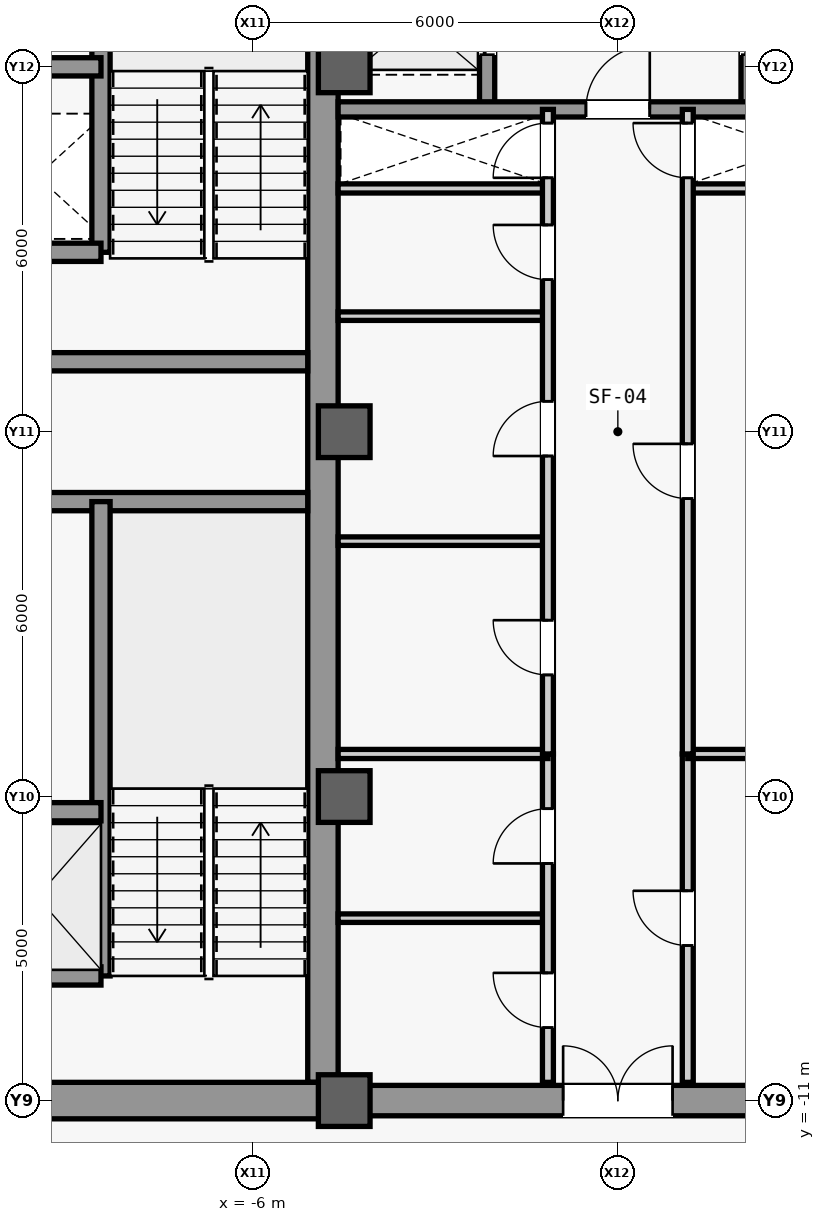
"""IFC4 building model, lengths in metres.
Left out: names, types, materials, properties, quantities, classifications, styles, units other than length and angle.
Written with IfcOpenShell. Run it as: python <this file> out.ifc"""

import sys

from ifc_helpers import new_model, si_unit, direction, frame, frame_2d, origin, origin_2d, place, context, subcontext, project, spatial, rectangle, extrude, source, transform, mapped, element, fill, save


model = new_model("IFC4")
c1 = context("Model", 3, precision=1e-05, world=origin(), true_north=direction((0.0, 1.0)))
c2 = subcontext(c1, "Body", "Model", "MODEL_VIEW")
j1 = project(units=[si_unit("LENGTHUNIT", "METRE"), si_unit("PLANEANGLEUNIT", "RADIAN")], contexts=[c1])
p1 = place(None, origin())
s1 = spatial("IfcSite", under=j1, at=p1, CompositionType="ELEMENT")
p2 = place(p1, origin())
s2 = spatial("IfcBuilding", under=s1, at=p2, CompositionType="ELEMENT")
p3 = place(p2, frame((0.0, 0.0, 211.1)))
s3 = spatial("IfcBuildingStorey", under=s2, at=p3, CompositionType="ELEMENT", Elevation=211.1)
m1 = source(origin(), c2, "Body", "SweptSolid", [
    extrude(rectangle(XDim=21.4, YDim=0.5, at=frame_2d((10.7, 0.0))), origin(), (0.0, 0.0, 1.0), 3.78),
])
p4 = place(p3, frame((-4.85, -10.7, 0.0), z_axis=(0.0, 0.0, 1.0), x_axis=(0.0, 1.0, 0.0)))
e1 = element("IfcWall", 1, at=p4, inside=s3, PredefinedType="SHEAR", context=c2, shape_type="MappedRepresentation", body=[
    mapped(m1, transform((0.0, 0.0, 0.0), scale=1.0)),
])
m2 = source(origin(), c2, "Body", "SweptSolid", [
    extrude(rectangle(XDim=5.9, YDim=0.6, at=frame_2d((2.95, 0.0))), origin(), (0.0, 0.0, 1.0), 3.78),
])
p5 = place(p3, frame((-10.75, -11.0, 0.0), z_axis=(0.0, 0.0, 1.0), x_axis=(1.0, 0.0, 0.0)))
e2 = element("IfcWall", 2, at=p5, inside=s3, PredefinedType="SHEAR", context=c2, shape_type="MappedRepresentation", body=[
    mapped(m2, transform((0.0, 0.0, 0.0), scale=1.0)),
])
m3 = source(origin(), c2, "Body", "SweptSolid", [
    extrude(rectangle(XDim=5.65, YDim=0.3, at=frame_2d((2.825, 0.0))), origin(), (0.0, 0.0, 1.0), 3.78),
])
for number, where, z_axis, x_axis in (
    (3, (-10.75, -1.15, 0.0), (0.0, 0.0, 1.0), (1.0, 0.0, 0.0)),
    (4, (-10.75, 1.15, 0.0), (0.0, 0.0, 1.0), (1.0, 0.0, 0.0)),
):
    element("IfcWall", number, at=place(p3, frame(where, z_axis=z_axis, x_axis=x_axis)), inside=s3, PredefinedType="SHEAR", context=c2, shape_type="MappedRepresentation", body=[
        mapped(m3, transform((0.0, 0.0, 0.0), scale=1.0)),
    ])
m4 = source(origin(), c2, "Body", "SweptSolid", [
    extrude(rectangle(XDim=9.2, YDim=0.5, at=frame_2d((4.6, 0.0))), origin(), (0.0, 0.0, 1.0), 3.78),
])
p6 = place(p3, frame((-4.6, -11.0, 0.0), z_axis=(0.0, 0.0, 1.0), x_axis=(1.0, 0.0, 0.0)))
e5 = element("IfcWall", 5, at=p6, inside=s3, PredefinedType="SHEAR", context=c2, shape_type="MappedRepresentation", body=[
    mapped(m4, transform((0.0, 0.0, 0.0), scale=1.0)),
])
m5 = source(origin(), c2, "Body", "SweptSolid", [
    extrude(rectangle(XDim=1.8, YDim=2.25, at=frame_2d((0.9, 1.125))), frame((0.0, 0.26, 0.0), z_axis=(0.0, -1.0, 0.0), x_axis=(1.0, 0.0, 0.0)), (0.0, 0.0, 1.0), 0.52),
])
p7 = place(p6, frame((3.7, 0.0, 0.0)))
e6 = element("IfcOpeningElement", 6, at=p7, cuts=e5, PredefinedType="OPENING", context=c2, shape_type="MappedRepresentation", body=[
    mapped(m5, transform((0.0, 0.0, 0.0), scale=1.0)),
])
m6 = source(origin(), c2, "Body", "SweptSolid", [
    extrude(rectangle(XDim=0.85, YDim=0.85, at=origin_2d()), origin(), (0.0, 0.0, 1.0), 4.0),
])
for number, where, z_axis, x_axis in (
    (7, (-4.5, -11.0, 0.0), (0.0, 0.0, 1.0), (1.0, 0.0, 0.0)),
    (8, (-4.5, -6.0, 0.0), (0.0, 0.0, 1.0), (1.0, 0.0, 0.0)),
    (9, (-4.5, 0.0, 0.0), (0.0, 0.0, 1.0), (1.0, 0.0, 0.0)),
    (10, (-4.5, 6.0, 0.0), (0.0, 0.0, 1.0), (1.0, 0.0, 0.0)),
):
    element("IfcColumn", number, at=place(p3, frame(where, z_axis=z_axis, x_axis=x_axis)), inside=s3, PredefinedType="COLUMN", context=c2, shape_type="MappedRepresentation", body=[
        mapped(m6, transform((0.0, 0.0, 0.0), scale=1.0)),
    ])
m7 = source(origin(), c2, "Body", "SweptSolid", [
    extrude(rectangle(XDim=7.8, YDim=0.3, at=frame_2d((3.9, 0.0))), origin(), (0.0, 0.0, 1.0), 3.78),
])
p8 = place(p3, frame((-8.5, -8.95, 0.0), z_axis=(0.0, 0.0, 1.0), x_axis=(0.0, 1.0, 0.0)))
e11 = element("IfcWall", 11, at=p8, inside=s3, PredefinedType="SHEAR", context=c2, shape_type="MappedRepresentation", body=[
    mapped(m7, transform((0.0, 0.0, 0.0), scale=1.0)),
])
m8 = source(origin(), c2, "Body", "SweptSolid", [
    extrude(rectangle(XDim=2.2, YDim=0.3, at=frame_2d((1.1, 0.0))), origin(), (0.0, 0.0, 1.0), 3.78),
])
for number, where, z_axis, x_axis in (
    (12, (-10.7, -8.95, 0.0), (0.0, 0.0, 1.0), (1.0, 0.0, 0.0)),
    (13, (-10.7, -6.25, 0.0), (0.0, 0.0, 1.0), (1.0, 0.0, 0.0)),
):
    element("IfcWall", number, at=place(p3, frame(where, z_axis=z_axis, x_axis=x_axis)), inside=s3, PredefinedType="SHEAR", context=c2, shape_type="MappedRepresentation", body=[
        mapped(m8, transform((0.0, 0.0, 0.0), scale=1.0)),
    ])
m9 = source(origin(), c2, "Body", "SweptSolid", [
    extrude(rectangle(XDim=7.75, YDim=0.3, at=frame_2d((3.875, 0.0))), origin(), (0.0, 0.0, 1.0), 3.78),
])
p9 = place(p3, frame((-8.5, 2.95, 0.0), z_axis=(0.0, 0.0, 1.0), x_axis=(0.0, 1.0, 0.0)))
e14 = element("IfcWall", 14, at=p9, inside=s3, PredefinedType="SHEAR", context=c2, shape_type="MappedRepresentation", body=[
    mapped(m9, transform((0.0, 0.0, 0.0), scale=1.0)),
])
for number, where, z_axis, x_axis in (
    (15, (-10.7, 2.95, 0.0), (0.0, 0.0, 1.0), (1.0, 0.0, 0.0)),
    (16, (-10.7, 6.0, 0.0), (0.0, 0.0, 1.0), (1.0, 0.0, 0.0)),
):
    element("IfcWall", number, at=place(p3, frame(where, z_axis=z_axis, x_axis=x_axis)), inside=s3, PredefinedType="SHEAR", context=c2, shape_type="MappedRepresentation", body=[
        mapped(m8, transform((0.0, 0.0, 0.0), scale=1.0)),
    ])
m10 = source(origin(), c2, "Body", "SweptSolid", [
    extrude(rectangle(XDim=3.45, YDim=0.15, at=frame_2d((1.725, 0.0))), origin(), (0.0, 0.0, 1.0), 3.78),
])
for number, where, z_axis, x_axis in (
    (17, (-4.6, 4.0, 0.0), (0.0, 0.0, 1.0), (1.0, 0.0, 0.0)),
    (18, (1.15, 4.0, 0.0), (0.0, 0.0, 1.0), (1.0, 0.0, 0.0)),
):
    element("IfcWall", number, at=place(p3, frame(where, z_axis=z_axis, x_axis=x_axis)), inside=s3, PredefinedType="PARTITIONING", context=c2, shape_type="MappedRepresentation", body=[
        mapped(m10, transform((0.0, 0.0, 0.0), scale=1.0)),
    ])
m11 = source(origin(), c2, "Body", "SweptSolid", [
    extrude(rectangle(XDim=3.45, YDim=0.14, at=frame_2d((1.725, 0.0))), origin(), (0.0, 0.0, 1.0), 3.78),
])
p10 = place(p3, frame((-4.6, -8.0, 0.0), z_axis=(0.0, 0.0, 1.0), x_axis=(1.0, 0.0, 0.0)))
e19 = element("IfcWall", 19, at=p10, inside=s3, PredefinedType="PARTITIONING", context=c2, shape_type="MappedRepresentation", body=[
    mapped(m11, transform((0.0, 0.0, 0.0), scale=1.0)),
])
m12 = source(origin(), c2, "Body", "SweptSolid", [
    extrude(rectangle(XDim=5.4, YDim=0.18, at=frame_2d((2.7, 0.0))), origin(), (0.0, 0.0, 1.0), 3.78),
])
p11 = place(p3, frame((-1.15, -10.7, 0.0), z_axis=(0.0, 0.0, 1.0), x_axis=(0.0, 1.0, 0.0)))
e20 = element("IfcWall", 20, at=p11, inside=s3, PredefinedType="PARTITIONING", context=c2, shape_type="MappedRepresentation", body=[
    mapped(m12, transform((0.0, 0.0, 0.0), scale=1.0)),
])
m13 = source(origin(), c2, "Body", "SweptSolid", [
    extrude(rectangle(XDim=0.9, YDim=2.15, at=frame_2d((0.45, 1.075))), frame((0.0, 0.1, 0.0), z_axis=(0.0, -1.0, 0.0), x_axis=(1.0, 0.0, 0.0)), (0.0, 0.0, 1.0), 0.2),
])
p12 = place(p11, frame((0.9, 0.0, 0.0)))
e21 = element("IfcOpeningElement", 21, at=p12, cuts=e20, PredefinedType="OPENING", context=c2, shape_type="MappedRepresentation", body=[
    mapped(m13, transform((0.0, 0.0, 0.0), scale=1.0)),
])
p13 = place(p11, frame((3.6, 0.0, 0.0)))
e22 = element("IfcOpeningElement", 22, at=p13, cuts=e20, PredefinedType="OPENING", context=c2, shape_type="MappedRepresentation", body=[
    mapped(m13, transform((0.0, 0.0, 0.0), scale=1.0)),
])
p14 = place(p3, frame((1.15, -10.7, 0.0), z_axis=(0.0, 0.0, 1.0), x_axis=(0.0, 1.0, 0.0)))
e23 = element("IfcWall", 23, at=p14, inside=s3, PredefinedType="PARTITIONING", context=c2, shape_type="MappedRepresentation", body=[
    mapped(m12, transform((0.0, 0.0, 0.0), scale=1.0)),
])
p15 = place(p14, frame((2.25, 0.0, 0.0)))
e24 = element("IfcOpeningElement", 24, at=p15, cuts=e23, PredefinedType="OPENING", context=c2, shape_type="MappedRepresentation", body=[
    mapped(m13, transform((0.0, 0.0, 0.0), scale=1.0)),
])
for number, where, z_axis, x_axis in (
    (25, (-4.6, -5.3, 0.0), (0.0, 0.0, 1.0), (1.0, 0.0, 0.0)),
    (26, (1.15, -5.3, 0.0), (0.0, 0.0, 1.0), (1.0, 0.0, 0.0)),
):
    element("IfcWall", number, at=place(p3, frame(where, z_axis=z_axis, x_axis=x_axis)), inside=s3, PredefinedType="PARTITIONING", context=c2, shape_type="MappedRepresentation", body=[
        mapped(m10, transform((0.0, 0.0, 0.0), scale=1.0)),
    ])
m14 = source(origin(), c2, "Body", "SweptSolid", [
    extrude(rectangle(XDim=5.4, YDim=0.25, at=frame_2d((2.7, 0.0))), origin(), (0.0, 0.0, 1.0), 3.78),
])
p16 = place(p3, frame((-2.15, 5.3, 0.0), z_axis=(0.0, 0.0, 1.0), x_axis=(0.0, 1.0, 0.0)))
e27 = element("IfcWall", 27, at=p16, inside=s3, PredefinedType="SHEAR", context=c2, shape_type="MappedRepresentation", body=[
    mapped(m14, transform((0.0, 0.0, 0.0), scale=1.0)),
])
m15 = source(origin(), c2, "Body", "SweptSolid", [
    extrude(rectangle(XDim=1.2, YDim=2.3, at=frame_2d((0.6, 1.15))), frame((0.0, 0.135, 0.0), z_axis=(0.0, -1.0, 0.0), x_axis=(1.0, 0.0, 0.0)), (0.0, 0.0, 1.0), 0.27),
])
p17 = place(p16, frame((3.3, 0.0, 0.0)))
e28 = element("IfcOpeningElement", 28, at=p17, cuts=e27, PredefinedType="OPENING", context=c2, shape_type="MappedRepresentation", body=[
    mapped(m15, transform((0.0, 0.0, 0.0), scale=1.0)),
])
p18 = place(p16, frame((0.9, 0.0, 0.0)))
e29 = element("IfcOpeningElement", 29, at=p18, cuts=e27, PredefinedType="OPENING", context=c2, shape_type="MappedRepresentation", body=[
    mapped(m15, transform((0.0, 0.0, 0.0), scale=1.0)),
])
p19 = place(p3, frame((2.15, 5.3, 0.0), z_axis=(0.0, 0.0, 1.0), x_axis=(0.0, 1.0, 0.0)))
e30 = element("IfcWall", 30, at=p19, inside=s3, PredefinedType="SHEAR", context=c2, shape_type="MappedRepresentation", body=[
    mapped(m14, transform((0.0, 0.0, 0.0), scale=1.0)),
])
p20 = place(p19, frame((3.3, 0.0, 0.0)))
e31 = element("IfcOpeningElement", 31, at=p20, cuts=e30, PredefinedType="OPENING", context=c2, shape_type="MappedRepresentation", body=[
    mapped(m15, transform((0.0, 0.0, 0.0), scale=1.0)),
])
p21 = place(p19, frame((0.9, 0.0, 0.0)))
e32 = element("IfcOpeningElement", 32, at=p21, cuts=e30, PredefinedType="OPENING", context=c2, shape_type="MappedRepresentation", body=[
    mapped(m15, transform((0.0, 0.0, 0.0), scale=1.0)),
])
m16 = source(origin(), c2, "Body", "SweptSolid", [
    extrude(rectangle(XDim=9.2, YDim=0.25, at=frame_2d((4.6, 0.0))), origin(), (0.0, 0.0, 1.0), 3.78),
])
p22 = place(p3, frame((-4.6, 5.3, 0.0), z_axis=(0.0, 0.0, 1.0), x_axis=(1.0, 0.0, 0.0)))
e33 = element("IfcWall", 33, at=p22, inside=s3, PredefinedType="SHEAR", context=c2, shape_type="MappedRepresentation", body=[
    mapped(m16, transform((0.0, 0.0, 0.0), scale=1.0)),
])
m17 = source(origin(), c2, "Body", "SweptSolid", [
    extrude(rectangle(XDim=1.05, YDim=2.2, at=frame_2d((0.525, 1.1))), frame((0.0, 0.135, 0.0), z_axis=(0.0, -1.0, 0.0), x_axis=(1.0, 0.0, 0.0)), (0.0, 0.0, 1.0), 0.27),
])
p23 = place(p22, frame((4.075, 0.0, 0.0)))
e34 = element("IfcOpeningElement", 34, at=p23, cuts=e33, PredefinedType="OPENING", context=c2, shape_type="MappedRepresentation", body=[
    mapped(m17, transform((0.0, 0.0, 0.0), scale=1.0)),
])
for number, where, z_axis, x_axis in (
    (35, (-4.6, -1.8, 0.0), (0.0, 0.0, 1.0), (1.0, 0.0, 0.0)),
    (36, (-4.6, 1.9, 0.0), (0.0, 0.0, 1.0), (1.0, 0.0, 0.0)),
):
    element("IfcWall", number, at=place(p3, frame(where, z_axis=z_axis, x_axis=x_axis)), inside=s3, PredefinedType="PARTITIONING", context=c2, shape_type="MappedRepresentation", body=[
        mapped(m11, transform((0.0, 0.0, 0.0), scale=1.0)),
    ])
m18 = source(origin(), c2, "Body", "SweptSolid", [
    extrude(rectangle(XDim=10.6, YDim=0.18, at=frame_2d((5.3, 0.0))), origin(), (0.0, 0.0, 1.0), 3.78),
])
p24 = place(p3, frame((-1.15, -5.3, 0.0), z_axis=(0.0, 0.0, 1.0), x_axis=(0.0, 1.0, 0.0)))
e37 = element("IfcWall", 37, at=p24, inside=s3, PredefinedType="PARTITIONING", context=c2, shape_type="MappedRepresentation", body=[
    mapped(m18, transform((0.0, 0.0, 0.0), scale=1.0)),
])
p25 = place(p24, frame((1.3, 0.0, 0.0)))
e38 = element("IfcOpeningElement", 38, at=p25, cuts=e37, PredefinedType="OPENING", context=c2, shape_type="MappedRepresentation", body=[
    mapped(m13, transform((0.0, 0.0, 0.0), scale=1.0)),
])
p26 = place(p24, frame((4.9, 0.0, 0.0)))
e39 = element("IfcOpeningElement", 39, at=p26, cuts=e37, PredefinedType="OPENING", context=c2, shape_type="MappedRepresentation", body=[
    mapped(m13, transform((0.0, 0.0, 0.0), scale=1.0)),
])
p27 = place(p24, frame((7.8, 0.0, 0.0)))
e40 = element("IfcOpeningElement", 40, at=p27, cuts=e37, PredefinedType="OPENING", context=c2, shape_type="MappedRepresentation", body=[
    mapped(m13, transform((0.0, 0.0, 0.0), scale=1.0)),
])
p28 = place(p24, frame((9.475, 0.0, 0.0)))
e41 = element("IfcOpeningElement", 41, at=p28, cuts=e37, PredefinedType="OPENING", context=c2, shape_type="MappedRepresentation", body=[
    mapped(m13, transform((0.0, 0.0, 0.0), scale=1.0)),
])
p29 = place(p3, frame((1.15, -5.3, 0.0), z_axis=(0.0, 0.0, 1.0), x_axis=(0.0, 1.0, 0.0)))
e42 = element("IfcWall", 42, at=p29, inside=s3, PredefinedType="PARTITIONING", context=c2, shape_type="MappedRepresentation", body=[
    mapped(m18, transform((0.0, 0.0, 0.0), scale=1.0)),
])
p30 = place(p29, frame((4.2, 0.0, 0.0)))
e43 = element("IfcOpeningElement", 43, at=p30, cuts=e42, PredefinedType="OPENING", context=c2, shape_type="MappedRepresentation", body=[
    mapped(m13, transform((0.0, 0.0, 0.0), scale=1.0)),
])
p31 = place(p29, frame((9.475, 0.0, 0.0)))
e44 = element("IfcOpeningElement", 44, at=p31, cuts=e42, PredefinedType="OPENING", context=c2, shape_type="MappedRepresentation", body=[
    mapped(m13, transform((0.0, 0.0, 0.0), scale=1.0)),
])
m19 = source(origin(), c2, "Body", "SweptSolid", [
    extrude(rectangle(XDim=0.9, YDim=2.15, at=frame_2d((0.45, 1.075))), frame((0.0, 0.025, 0.0), z_axis=(0.0, -1.0, 0.0), x_axis=(1.0, 0.0, 0.0)), (0.0, 0.0, 1.0), 0.05),
])
p32 = place(p12, origin())
e45 = element("IfcDoor", 45, at=p32, inside=s3, OperationType="SINGLE_SWING_RIGHT", PredefinedType="DOOR", context=c2, shape_type="MappedRepresentation", body=[
    mapped(m19, transform((0.0, 0.0, 0.0), scale=1.0)),
])
fill(e21, e45)
p33 = place(p13, origin())
e46 = element("IfcDoor", 46, at=p33, inside=s3, OperationType="SINGLE_SWING_LEFT", PredefinedType="DOOR", context=c2, shape_type="MappedRepresentation", body=[
    mapped(m19, transform((0.0, 0.0, 0.0), scale=1.0)),
])
fill(e22, e46)
p34 = place(p15, origin())
e47 = element("IfcDoor", 47, at=p34, inside=s3, OperationType="SINGLE_SWING_RIGHT", PredefinedType="DOOR", context=c2, shape_type="MappedRepresentation", body=[
    mapped(m19, transform((0.0, 0.0, 0.0), scale=1.0)),
])
fill(e24, e47)
m20 = source(origin(), c2, "Body", "SweptSolid", [
    extrude(rectangle(XDim=1.8, YDim=2.25, at=frame_2d((0.9, 1.125))), frame((0.0, 0.025, 0.0), z_axis=(0.0, -1.0, 0.0), x_axis=(1.0, 0.0, 0.0)), (0.0, 0.0, 1.0), 0.05),
])
p35 = place(p7, origin())
e48 = element("IfcDoor", 48, at=p35, inside=s3, OperationType="SINGLE_SWING_LEFT", PredefinedType="DOOR", context=c2, shape_type="MappedRepresentation", body=[
    mapped(m20, transform((0.0, 0.0, 0.0), scale=1.0)),
])
fill(e6, e48)
m21 = source(origin(), c2, "Body", "SweptSolid", [
    extrude(rectangle(XDim=1.05, YDim=2.2, at=frame_2d((0.525, 1.1))), frame((0.0, 0.025, 0.0), z_axis=(0.0, -1.0, 0.0), x_axis=(1.0, 0.0, 0.0)), (0.0, 0.0, 1.0), 0.05),
])
p36 = place(p23, origin())
e49 = element("IfcDoor", 49, at=p36, inside=s3, OperationType="SINGLE_SWING_RIGHT", PredefinedType="DOOR", context=c2, shape_type="MappedRepresentation", body=[
    mapped(m21, transform((0.0, 0.0, 0.0), scale=1.0)),
])
fill(e34, e49)
p37 = place(p25, origin())
e50 = element("IfcDoor", 50, at=p37, inside=s3, OperationType="SINGLE_SWING_RIGHT", PredefinedType="DOOR", context=c2, shape_type="MappedRepresentation", body=[
    mapped(m19, transform((0.0, 0.0, 0.0), scale=1.0)),
])
fill(e38, e50)
p38 = place(p26, origin())
e51 = element("IfcDoor", 51, at=p38, inside=s3, OperationType="SINGLE_SWING_LEFT", PredefinedType="DOOR", context=c2, shape_type="MappedRepresentation", body=[
    mapped(m19, transform((0.0, 0.0, 0.0), scale=1.0)),
])
fill(e39, e51)
p39 = place(p27, origin())
e52 = element("IfcDoor", 52, at=p39, inside=s3, OperationType="SINGLE_SWING_RIGHT", PredefinedType="DOOR", context=c2, shape_type="MappedRepresentation", body=[
    mapped(m19, transform((0.0, 0.0, 0.0), scale=1.0)),
])
fill(e40, e52)
p40 = place(p30, origin())
e53 = element("IfcDoor", 53, at=p40, inside=s3, OperationType="SINGLE_SWING_RIGHT", PredefinedType="DOOR", context=c2, shape_type="MappedRepresentation", body=[
    mapped(m19, transform((0.0, 0.0, 0.0), scale=1.0)),
])
fill(e43, e53)
p41 = place(p28, origin())
e54 = element("IfcDoor", 54, at=p41, inside=s3, OperationType="SINGLE_SWING_LEFT", PredefinedType="DOOR", context=c2, shape_type="MappedRepresentation", body=[
    mapped(m19, transform((0.0, 0.0, 0.0), scale=1.0)),
])
fill(e41, e54)
p42 = place(p31, origin())
e55 = element("IfcDoor", 55, at=p42, inside=s3, OperationType="SINGLE_SWING_RIGHT", PredefinedType="DOOR", context=c2, shape_type="MappedRepresentation", body=[
    mapped(m19, transform((0.0, 0.0, 0.0), scale=1.0)),
])
fill(e44, e55)
m22 = source(origin(), c2, "Body", "SweptSolid", [
    extrude(rectangle(XDim=1.2, YDim=2.3, at=frame_2d((0.6, 1.15))), frame((0.0, 0.025, 0.0), z_axis=(0.0, -1.0, 0.0), x_axis=(1.0, 0.0, 0.0)), (0.0, 0.0, 1.0), 0.05),
])
p43 = place(p18, origin())
e56 = element("IfcDoor", 56, at=p43, inside=s3, OperationType="SLIDING_TO_LEFT", PredefinedType="DOOR", context=c2, shape_type="MappedRepresentation", body=[
    mapped(m22, transform((0.0, 0.0, 0.0), scale=1.0)),
])
fill(e29, e56)
save(model, sys.argv[1])
